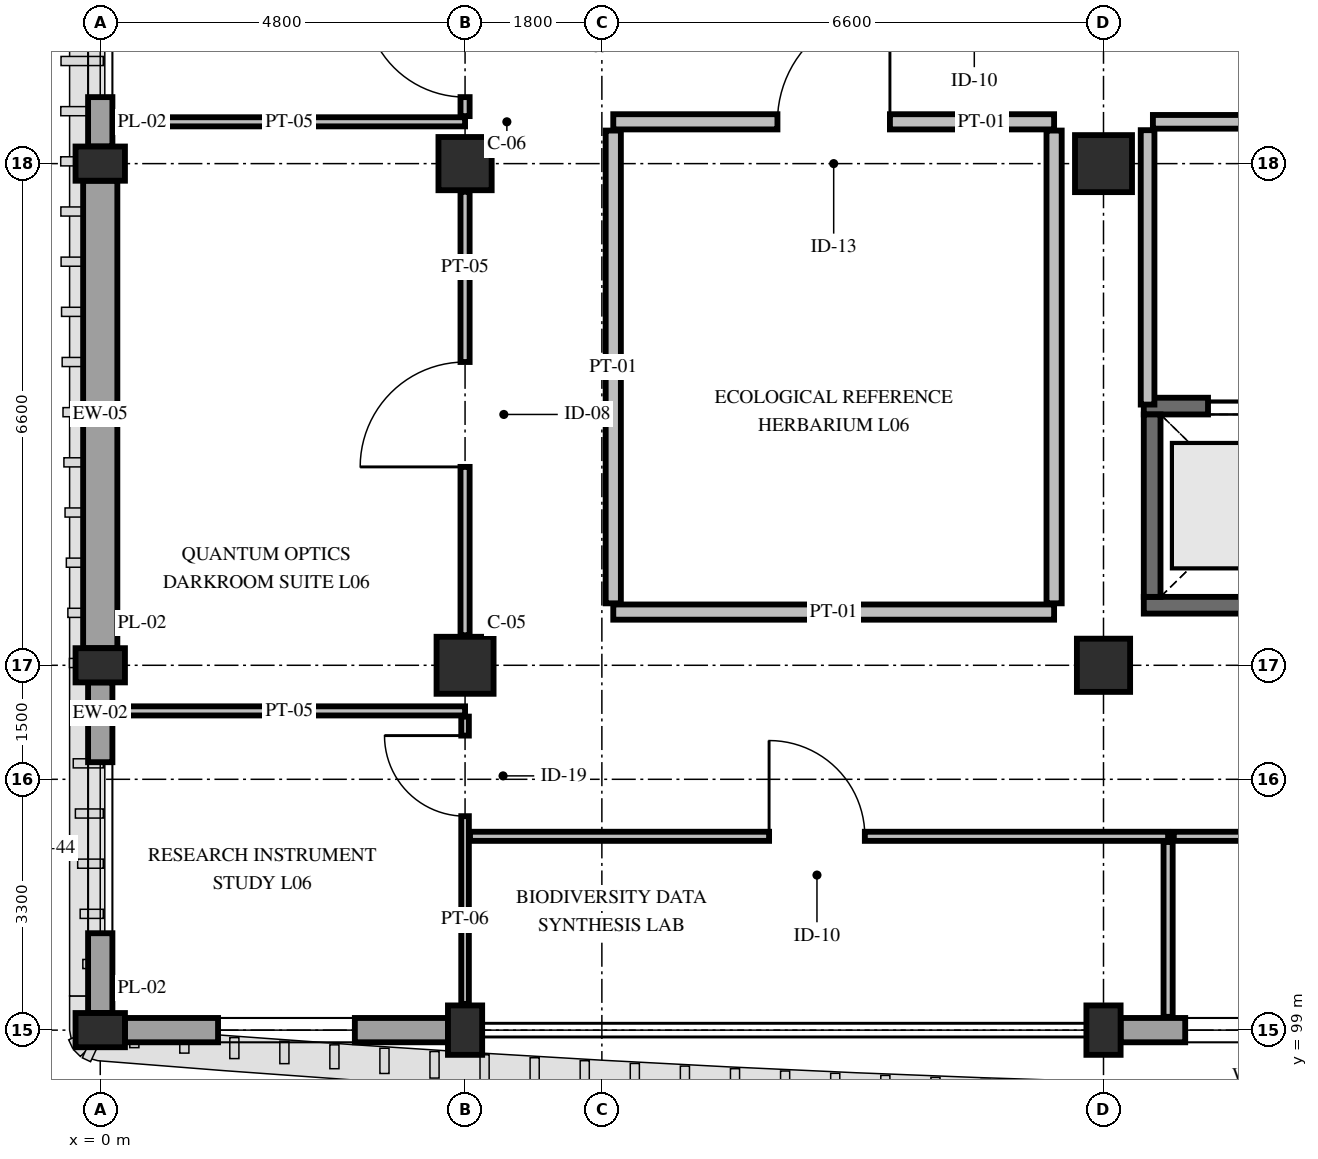
"""IFC4 building model, lengths in metres.
Left out: names, types, materials, properties, quantities, classifications, styles, units other than length and angle.
Written with IfcOpenShell. Run it as: python <this file> out.ifc"""

import sys

from ifc_helpers import new_model, si_unit, direction, frame, frame_2d, origin, origin_2d, place, context, subcontext, project, spatial, rectangle, extrude, element, fill, save


model = new_model("IFC4")
c1 = context("Model", 3, precision=1e-05, world=origin(), true_north=direction((0.0, 1.0)))
c2 = subcontext(c1, "Body", "Model", "MODEL_VIEW")
j1 = project(units=[si_unit("LENGTHUNIT", "METRE"), si_unit("PLANEANGLEUNIT", "RADIAN")], contexts=[c1])
p1 = place(None, origin())
s1 = spatial("IfcSite", under=j1, at=p1, CompositionType="ELEMENT")
p2 = place(p1, origin())
s2 = spatial("IfcBuilding", under=s1, at=p2, CompositionType="ELEMENT")
p3 = place(p2, frame((0.0, 0.0, 29.4)))
s3 = spatial("IfcBuildingStorey", under=s2, at=p3, CompositionType="ELEMENT", Elevation=29.4)
for number, where, z_axis, x_axis in (
    (1, (0.0, 99.0, 0.0), (0.0, 0.0, 1.0), (0.0, 1.0, 0.0)),
    (2, (0.0, 103.8, 0.0), (0.0, 0.0, 1.0), (0.0, 1.0, 0.0)),
    (3, (0.0, 110.4, 0.0), (0.0, 0.0, 1.0), (0.0, 1.0, 0.0)),
    (4, (4.8, 99.0, 0.0), (0.0, 0.0, 1.0), (1.0, 0.0, 0.0)),
):
    element("IfcColumn", number, at=place(p3, frame(where, z_axis=z_axis, x_axis=x_axis)), inside=s3, PredefinedType="PILASTER", context=c2, shape_type="SweptSolid", body=[
        extrude(rectangle(XDim=0.45, YDim=0.65, at=origin_2d()), origin(), (0.0, 0.0, 1.0), 4.8),
    ])
p4 = place(p3, frame((4.8, 103.8, 0.0), z_axis=(0.0, 0.0, 1.0), x_axis=(1.0, 0.0, 0.0)))
e5 = element("IfcColumn", 5, at=p4, inside=s3, PredefinedType="COLUMN", context=c2, shape_type="SweptSolid", body=[
    extrude(rectangle(XDim=0.75, YDim=0.75, at=origin_2d()), origin(), (0.0, 0.0, 1.0), 4.8),
])
p5 = place(p3, frame((4.8, 110.4, 0.0), z_axis=(0.0, 0.0, 1.0), x_axis=(1.0, 0.0, 0.0)))
e6 = element("IfcColumn", 6, at=p5, inside=s3, PredefinedType="COLUMN", context=c2, shape_type="SweptSolid", body=[
    extrude(rectangle(XDim=0.7, YDim=0.7, at=origin_2d()), origin(), (0.0, 0.0, 1.0), 4.8),
])
p6 = place(p3, frame((13.2, 99.0, 0.0), z_axis=(0.0, 0.0, 1.0), x_axis=(1.0, 0.0, 0.0)))
e7 = element("IfcColumn", 7, at=p6, inside=s3, PredefinedType="PILASTER", context=c2, shape_type="SweptSolid", body=[
    extrude(rectangle(XDim=0.45, YDim=0.65, at=origin_2d()), origin(), (0.0, 0.0, 1.0), 4.8),
])
p7 = place(p3, frame((13.2, 103.8, 0.0), z_axis=(0.0, 0.0, 1.0), x_axis=(1.0, 0.0, 0.0)))
e8 = element("IfcColumn", 8, at=p7, inside=s3, PredefinedType="COLUMN", context=c2, shape_type="SweptSolid", body=[
    extrude(rectangle(XDim=0.7, YDim=0.7, at=origin_2d()), origin(), (0.0, 0.0, 1.0), 4.8),
])
p8 = place(p3, frame((13.2, 110.4, 0.0), z_axis=(0.0, 0.0, 1.0), x_axis=(1.0, 0.0, 0.0)))
e9 = element("IfcColumn", 9, at=p8, inside=s3, PredefinedType="COLUMN", context=c2, shape_type="SweptSolid", body=[
    extrude(rectangle(XDim=0.75, YDim=0.75, at=origin_2d()), origin(), (0.0, 0.0, 1.0), 4.8),
])
p9 = place(p3, frame((0.0, 99.225, 0.0), z_axis=(0.0, 0.0, 1.0), x_axis=(0.0, 1.0, 0.0)))
e10 = element("IfcWall", 10, at=p9, inside=s3, PredefinedType="STANDARD", context=c2, shape_type="SweptSolid", body=[
    extrude(rectangle(XDim=4.35, YDim=0.32, at=frame_2d((2.175, 0.0))), origin(), (0.0, 0.0, 1.0), 3.95),
])
p10 = place(p9, frame((1.05, 0.0, 0.85)))
e11 = element("IfcOpeningElement", 11, at=p10, cuts=e10, PredefinedType="OPENING", context=c2, shape_type="SweptSolid", body=[
    extrude(rectangle(XDim=2.25, YDim=2.24, at=frame_2d((1.125, 1.12))), frame((0.0, 0.175, 0.0), z_axis=(0.0, -1.0, 0.0), x_axis=(1.0, 0.0, 0.0)), (0.0, 0.0, 1.0), 0.35),
])
p11 = place(p3, frame((0.0, 104.025, 0.0), z_axis=(0.0, 0.0, 1.0), x_axis=(0.0, 1.0, 0.0)))
e12 = element("IfcWall", 12, at=p11, inside=s3, PredefinedType="SOLIDWALL", context=c2, shape_type="SweptSolid", body=[
    extrude(rectangle(XDim=6.15, YDim=0.45, at=frame_2d((3.075, 0.0))), origin(), (0.0, 0.0, 1.0), 3.95),
])
p12 = place(p3, frame((0.0, 110.625, 0.0), z_axis=(0.0, 0.0, 1.0), x_axis=(0.0, 1.0, 0.0)))
e13 = element("IfcWall", 13, at=p12, inside=s3, PredefinedType="STANDARD", context=c2, shape_type="SweptSolid", body=[
    extrude(rectangle(XDim=6.45, YDim=0.32, at=frame_2d((3.225, 0.0))), origin(), (0.0, 0.0, 1.0), 3.95),
])
p13 = place(p12, frame((0.65, 0.0, 0.85)))
e14 = element("IfcOpeningElement", 14, at=p13, cuts=e13, PredefinedType="OPENING", context=c2, shape_type="SweptSolid", body=[
    extrude(rectangle(XDim=2.25, YDim=2.24, at=frame_2d((1.125, 1.12))), frame((0.0, 0.175, 0.0), z_axis=(0.0, -1.0, 0.0), x_axis=(1.0, 0.0, 0.0)), (0.0, 0.0, 1.0), 0.35),
])
p14 = place(p12, frame((3.55, 0.0, 0.85)))
e15 = element("IfcOpeningElement", 15, at=p14, cuts=e13, PredefinedType="OPENING", context=c2, shape_type="SweptSolid", body=[
    extrude(rectangle(XDim=2.25, YDim=2.24, at=frame_2d((1.125, 1.12))), frame((0.0, 0.175, 0.0), z_axis=(0.0, -1.0, 0.0), x_axis=(1.0, 0.0, 0.0)), (0.0, 0.0, 1.0), 0.35),
])
p15 = place(p3, frame((19.575, 99.0, 0.0), z_axis=(0.0, 0.0, 1.0), x_axis=(-1.0, 0.0, 0.0)))
e16 = element("IfcWall", 16, at=p15, inside=s3, PredefinedType="STANDARD", context=c2, shape_type="SweptSolid", body=[
    extrude(rectangle(XDim=6.15, YDim=0.32, at=frame_2d((3.075, 0.0))), origin(), (0.0, 0.0, 1.0), 3.93),
])
p16 = place(p15, frame((0.85, 0.0, 0.85)))
e17 = element("IfcOpeningElement", 17, at=p16, cuts=e16, PredefinedType="OPENING", context=c2, shape_type="SweptSolid", body=[
    extrude(rectangle(XDim=1.8, YDim=1.5, at=frame_2d((0.9, 0.75))), frame((0.0, 0.175, 0.0), z_axis=(0.0, -1.0, 0.0), x_axis=(1.0, 0.0, 0.0)), (0.0, 0.0, 1.0), 0.35),
])
p17 = place(p15, frame((3.5, 0.0, 0.85)))
e18 = element("IfcOpeningElement", 18, at=p17, cuts=e16, PredefinedType="OPENING", context=c2, shape_type="SweptSolid", body=[
    extrude(rectangle(XDim=1.8, YDim=1.5, at=frame_2d((0.9, 0.75))), frame((0.0, 0.175, 0.0), z_axis=(0.0, -1.0, 0.0), x_axis=(1.0, 0.0, 0.0)), (0.0, 0.0, 1.0), 0.35),
])
p18 = place(p3, frame((4.575, 99.0, 0.0), z_axis=(0.0, 0.0, 1.0), x_axis=(-1.0, 0.0, 0.0)))
e19 = element("IfcWall", 19, at=p18, inside=s3, PredefinedType="STANDARD", context=c2, shape_type="SweptSolid", body=[
    extrude(rectangle(XDim=4.25, YDim=0.32, at=frame_2d((2.125, 0.0))), origin(), (0.0, 0.0, 1.0), 3.95),
])
p19 = place(p18, frame((1.225, 0.0, 0.85)))
e20 = element("IfcOpeningElement", 20, at=p19, cuts=e19, PredefinedType="OPENING", context=c2, shape_type="SweptSolid", body=[
    extrude(rectangle(XDim=1.8, YDim=1.5, at=frame_2d((0.9, 0.75))), frame((0.0, 0.175, 0.0), z_axis=(0.0, -1.0, 0.0), x_axis=(1.0, 0.0, 0.0)), (0.0, 0.0, 1.0), 0.35),
])
p20 = place(p3, frame((13.73, 104.59, 0.0), z_axis=(0.0, 0.0, 1.0), x_axis=(1.0, 0.0, 0.0)))
e21 = element("IfcWall", 21, at=p20, inside=s3, PredefinedType="SHEAR", context=c2, shape_type="SweptSolid", body=[
    extrude(rectangle(XDim=2.89, YDim=0.22, at=frame_2d((1.445, 0.0))), origin(), (0.0, 0.0, 1.0), 4.52),
])
p21 = place(p3, frame((13.73, 107.21, 0.0), z_axis=(0.0, 0.0, 1.0), x_axis=(1.0, 0.0, 0.0)))
e22 = element("IfcWall", 22, at=p21, inside=s3, PredefinedType="SHEAR", context=c2, shape_type="SweptSolid", body=[
    extrude(rectangle(XDim=2.89, YDim=0.22, at=frame_2d((1.445, 0.0))), origin(), (0.0, 0.0, 1.0), 4.52),
])
p22 = place(p21, frame((0.845, 0.0, 0.0)))
e23 = element("IfcOpeningElement", 23, at=p22, cuts=e22, PredefinedType="OPENING", context=c2, shape_type="SweptSolid", body=[
    extrude(rectangle(XDim=1.2, YDim=2.2, at=frame_2d((0.6, 1.1))), frame((0.0, 0.125, 0.0), z_axis=(0.0, -1.0, 0.0), x_axis=(1.0, 0.0, 0.0)), (0.0, 0.0, 1.0), 0.25),
])
p23 = place(p3, frame((13.84, 104.7, 0.0), z_axis=(0.0, 0.0, 1.0), x_axis=(0.0, 1.0, 0.0)))
e24 = element("IfcWall", 24, at=p23, inside=s3, PredefinedType="SHEAR", context=c2, shape_type="SweptSolid", body=[
    extrude(rectangle(XDim=2.4, YDim=0.22, at=frame_2d((1.2, 0.0))), origin(), (0.0, 0.0, 1.0), 4.52),
])
p24 = place(p3, frame((13.85, 110.95, 0.0), z_axis=(0.0, 0.0, 1.0), x_axis=(1.0, 0.0, 0.0)))
e25 = element("IfcWall", 25, at=p24, inside=s3, PredefinedType="PARTITIONING", context=c2, shape_type="SweptSolid", body=[
    extrude(rectangle(XDim=5.47, YDim=0.18, at=frame_2d((2.735, 0.0))), origin(), (0.0, 0.0, 1.0), 4.345),
])
p25 = place(p24, frame((1.85, 0.0, 0.0)))
e26 = element("IfcOpeningElement", 26, at=p25, cuts=e25, PredefinedType="OPENING", context=c2, shape_type="SweptSolid", body=[
    extrude(rectangle(XDim=1.6, YDim=2.25, at=frame_2d((0.8, 1.125))), frame((0.0, 0.105, 0.0), z_axis=(0.0, -1.0, 0.0), x_axis=(1.0, 0.0, 0.0)), (0.0, 0.0, 1.0), 0.21),
])
p26 = place(p3, frame((13.78, 107.23, 0.0), z_axis=(0.0, 0.0, 1.0), x_axis=(0.0, 1.0, 0.0)))
e27 = element("IfcWall", 27, at=p26, inside=s3, PredefinedType="PARTITIONING", context=c2, shape_type="SweptSolid", body=[
    extrude(rectangle(XDim=3.61, YDim=0.18, at=frame_2d((1.805, 0.0))), origin(), (0.0, 0.0, 1.0), 4.18),
])
p27 = place(p3, frame((6.75, 104.5, 0.0), z_axis=(0.0, 0.0, 1.0), x_axis=(1.0, 0.0, 0.0)))
e28 = element("IfcWall", 28, at=p27, inside=s3, PredefinedType="PARTITIONING", context=c2, shape_type="SweptSolid", body=[
    extrude(rectangle(XDim=5.8, YDim=0.2, at=frame_2d((2.9, 0.0))), origin(), (0.0, 0.0, 1.0), 4.345),
])
p28 = place(p3, frame((6.75, 110.95, 0.0), z_axis=(0.0, 0.0, 1.0), x_axis=(1.0, 0.0, 0.0)))
e29 = element("IfcWall", 29, at=p28, inside=s3, PredefinedType="PARTITIONING", context=c2, shape_type="SweptSolid", body=[
    extrude(rectangle(XDim=5.8, YDim=0.2, at=frame_2d((2.9, 0.0))), origin(), (0.0, 0.0, 1.0), 4.345),
])
p29 = place(p28, frame((2.16, 0.0, 0.0)))
e30 = element("IfcOpeningElement", 30, at=p29, cuts=e29, PredefinedType="OPENING", context=c2, shape_type="SweptSolid", body=[
    extrude(rectangle(XDim=1.48, YDim=2.3, at=frame_2d((0.74, 1.15))), frame((0.0, 0.115, 0.0), z_axis=(0.0, -1.0, 0.0), x_axis=(1.0, 0.0, 0.0)), (0.0, 0.0, 1.0), 0.23),
])
for number, where, z_axis, x_axis in (
    (31, (6.75, 104.615, 0.0), (0.0, 0.0, 1.0), (0.0, 1.0, 0.0)),
    (32, (12.55, 104.615, 0.0), (0.0, 0.0, 1.0), (0.0, 1.0, 0.0)),
):
    element("IfcWall", number, at=place(p3, frame(where, z_axis=z_axis, x_axis=x_axis)), inside=s3, PredefinedType="PARTITIONING", context=c2, shape_type="SweptSolid", body=[
        extrude(rectangle(XDim=6.22, YDim=0.2, at=frame_2d((3.11, 0.0))), origin(), (0.0, 0.0, 1.0), 3.83),
    ])
for number, where, z_axis, x_axis in (
    (33, (0.175, 103.2, 0.0), (0.0, 0.0, 1.0), (1.0, 0.0, 0.0)),
    (34, (0.175, 110.95, 0.0), (0.0, 0.0, 1.0), (1.0, 0.0, 0.0)),
):
    element("IfcWall", number, at=place(p3, frame(where, z_axis=z_axis, x_axis=x_axis)), inside=s3, PredefinedType="PARTITIONING", context=c2, shape_type="SweptSolid", body=[
        extrude(rectangle(XDim=4.625, YDim=0.12, at=frame_2d((2.312, 0.0))), origin(), (0.0, 0.0, 1.0), 4.08),
    ])
p30 = place(p3, frame((4.8, 104.195, 0.0), z_axis=(0.0, 0.0, 1.0), x_axis=(0.0, 1.0, 0.0)))
e35 = element("IfcWall", 35, at=p30, inside=s3, PredefinedType="PARTITIONING", context=c2, shape_type="SweptSolid", body=[
    extrude(rectangle(XDim=5.835, YDim=0.12, at=frame_2d((2.917, 0.0))), origin(), (0.0, 0.0, 1.0), 4.08),
])
p31 = place(p30, frame((2.215, 0.0, 0.0)))
e36 = element("IfcOpeningElement", 36, at=p31, cuts=e35, PredefinedType="OPENING", context=c2, shape_type="SweptSolid", body=[
    extrude(rectangle(XDim=1.38, YDim=2.25, at=frame_2d((0.69, 1.125))), frame((0.0, 0.075, 0.0), z_axis=(0.0, -1.0, 0.0), x_axis=(1.0, 0.0, 0.0)), (0.0, 0.0, 1.0), 0.15),
])
p32 = place(p3, frame((4.8, 111.025, 0.0), z_axis=(0.0, 0.0, 1.0), x_axis=(0.0, 1.0, 0.0)))
e37 = element("IfcWall", 37, at=p32, inside=s3, PredefinedType="PARTITIONING", context=c2, shape_type="SweptSolid", body=[
    extrude(rectangle(XDim=5.88, YDim=0.12, at=frame_2d((2.94, 0.0))), origin(), (0.0, 0.0, 1.0), 4.08),
])
p33 = place(p32, frame((0.25, 0.0, 0.0)))
e38 = element("IfcOpeningElement", 38, at=p33, cuts=e37, PredefinedType="OPENING", context=c2, shape_type="SweptSolid", body=[
    extrude(rectangle(XDim=1.32, YDim=2.2, at=frame_2d((0.66, 1.1))), frame((0.0, 0.075, 0.0), z_axis=(0.0, -1.0, 0.0), x_axis=(1.0, 0.0, 0.0)), (0.0, 0.0, 1.0), 0.15),
])
p34 = place(p3, frame((4.8, 99.345, 0.0), z_axis=(0.0, 0.0, 1.0), x_axis=(0.0, 1.0, 0.0)))
e39 = element("IfcWall", 39, at=p34, inside=s3, PredefinedType="PARTITIONING", context=c2, shape_type="SweptSolid", body=[
    extrude(rectangle(XDim=3.78, YDim=0.1, at=frame_2d((1.89, 0.0))), origin(), (0.0, 0.0, 1.0), 4.08),
])
p35 = place(p34, frame((2.47, 0.0, 0.0)))
e40 = element("IfcOpeningElement", 40, at=p35, cuts=e39, PredefinedType="OPENING", context=c2, shape_type="SweptSolid", body=[
    extrude(rectangle(XDim=1.06, YDim=2.2, at=frame_2d((0.53, 1.1))), frame((0.0, 0.065, 0.0), z_axis=(0.0, -1.0, 0.0), x_axis=(1.0, 0.0, 0.0)), (0.0, 0.0, 1.0), 0.13),
])
p36 = place(p3, frame((4.865, 101.55, 0.0), z_axis=(0.0, 0.0, 1.0), x_axis=(1.0, 0.0, 0.0)))
e41 = element("IfcWall", 41, at=p36, inside=s3, PredefinedType="PARTITIONING", context=c2, shape_type="SweptSolid", body=[
    extrude(rectangle(XDim=9.185, YDim=0.12, at=frame_2d((4.593, 0.0))), origin(), (0.0, 0.0, 1.0), 4.08),
])
p37 = place(p36, frame((3.935, 0.0, 0.0)))
e42 = element("IfcOpeningElement", 42, at=p37, cuts=e41, PredefinedType="OPENING", context=c2, shape_type="SweptSolid", body=[
    extrude(rectangle(XDim=1.26, YDim=2.2, at=frame_2d((0.63, 1.1))), frame((0.0, 0.075, 0.0), z_axis=(0.0, -1.0, 0.0), x_axis=(1.0, 0.0, 0.0)), (0.0, 0.0, 1.0), 0.15),
])
p38 = place(p3, frame((14.05, 99.175, 0.0), z_axis=(0.0, 0.0, 1.0), x_axis=(0.0, 1.0, 0.0)))
e43 = element("IfcWall", 43, at=p38, inside=s3, PredefinedType="PARTITIONING", context=c2, shape_type="SweptSolid", body=[
    extrude(rectangle(XDim=2.3, YDim=0.12, at=frame_2d((1.15, 0.0))), origin(), (0.0, 0.0, 1.0), 3.93),
])
p39 = place(p3, frame((14.125, 101.55, 0.0), z_axis=(0.0, 0.0, 1.0), x_axis=(1.0, 0.0, 0.0)))
e44 = element("IfcWall", 44, at=p39, inside=s3, PredefinedType="PARTITIONING", context=c2, shape_type="SweptSolid", body=[
    extrude(rectangle(XDim=13.475, YDim=0.12, at=frame_2d((6.738, 0.0))), origin(), (0.0, 0.0, 1.0), 4.13),
])
p40 = place(p39, frame((6.385, 0.0, 0.0)))
e45 = element("IfcOpeningElement", 45, at=p40, cuts=e44, PredefinedType="OPENING", context=c2, shape_type="SweptSolid", body=[
    extrude(rectangle(XDim=1.68, YDim=2.3, at=frame_2d((0.84, 1.15))), frame((0.0, 0.075, 0.0), z_axis=(0.0, -1.0, 0.0), x_axis=(1.0, 0.0, 0.0)), (0.0, 0.0, 1.0), 0.15),
])
p41 = place(p10, origin())
e46 = element("IfcWindow", 46, at=p41, inside=s3, PartitioningType="DOUBLE_PANEL_VERTICAL", PredefinedType="WINDOW", context=c2, shape_type="SweptSolid", body=[
    extrude(rectangle(XDim=2.25, YDim=2.24, at=frame_2d((1.125, 1.12))), frame((0.0, 0.03, 0.0), z_axis=(0.0, -1.0, 0.0), x_axis=(1.0, 0.0, 0.0)), (0.0, 0.0, 1.0), 0.06),
])
fill(e11, e46)
p42 = place(p13, origin())
e47 = element("IfcWindow", 47, at=p42, inside=s3, PartitioningType="DOUBLE_PANEL_VERTICAL", PredefinedType="WINDOW", context=c2, shape_type="SweptSolid", body=[
    extrude(rectangle(XDim=2.25, YDim=2.24, at=frame_2d((1.125, 1.12))), frame((0.0, 0.03, 0.0), z_axis=(0.0, -1.0, 0.0), x_axis=(1.0, 0.0, 0.0)), (0.0, 0.0, 1.0), 0.06),
])
fill(e14, e47)
p43 = place(p17, origin())
e48 = element("IfcWindow", 48, at=p43, inside=s3, PartitioningType="DOUBLE_PANEL_VERTICAL", PredefinedType="WINDOW", context=c2, shape_type="SweptSolid", body=[
    extrude(rectangle(XDim=1.8, YDim=1.5, at=frame_2d((0.9, 0.75))), frame((0.0, 0.03, 0.0), z_axis=(0.0, -1.0, 0.0), x_axis=(1.0, 0.0, 0.0)), (0.0, 0.0, 1.0), 0.06),
])
fill(e18, e48)
p44 = place(p19, origin())
e49 = element("IfcWindow", 49, at=p44, inside=s3, PartitioningType="DOUBLE_PANEL_VERTICAL", PredefinedType="WINDOW", context=c2, shape_type="SweptSolid", body=[
    extrude(rectangle(XDim=1.8, YDim=1.5, at=frame_2d((0.9, 0.75))), frame((0.0, 0.03, 0.0), z_axis=(0.0, -1.0, 0.0), x_axis=(1.0, 0.0, 0.0)), (0.0, 0.0, 1.0), 0.06),
])
fill(e20, e49)
p45 = place(p22, origin())
e50 = element("IfcDoor", 50, at=p45, inside=s3, OperationType="DOUBLE_DOOR_SLIDING", PredefinedType="DOOR", context=c2, shape_type="SweptSolid", body=[
    extrude(rectangle(XDim=1.2, YDim=2.2, at=frame_2d((0.6, 1.1))), frame((0.0, 0.025, 0.0), z_axis=(0.0, -1.0, 0.0), x_axis=(1.0, 0.0, 0.0)), (0.0, 0.0, 1.0), 0.05),
])
fill(e23, e50)
p46 = place(p29, origin())
e51 = element("IfcDoor", 51, at=p46, inside=s3, OperationType="SINGLE_SWING_RIGHT", PredefinedType="DOOR", context=c2, shape_type="SweptSolid", body=[
    extrude(rectangle(XDim=1.48, YDim=2.3, at=frame_2d((0.74, 1.15))), frame((0.0, 0.025, 0.0), z_axis=(0.0, -1.0, 0.0), x_axis=(1.0, 0.0, 0.0)), (0.0, 0.0, 1.0), 0.05),
])
fill(e30, e51)
p47 = place(p31, origin())
e52 = element("IfcDoor", 52, at=p47, inside=s3, OperationType="SINGLE_SWING_LEFT", PredefinedType="DOOR", context=c2, shape_type="SweptSolid", body=[
    extrude(rectangle(XDim=1.38, YDim=2.25, at=frame_2d((0.69, 1.125))), frame((0.0, 0.025, 0.0), z_axis=(0.0, -1.0, 0.0), x_axis=(1.0, 0.0, 0.0)), (0.0, 0.0, 1.0), 0.05),
])
fill(e36, e52)
p48 = place(p33, origin())
e53 = element("IfcDoor", 53, at=p48, inside=s3, OperationType="SINGLE_SWING_RIGHT", PredefinedType="DOOR", context=c2, shape_type="SweptSolid", body=[
    extrude(rectangle(XDim=1.32, YDim=2.2, at=frame_2d((0.66, 1.1))), frame((0.0, 0.025, 0.0), z_axis=(0.0, -1.0, 0.0), x_axis=(1.0, 0.0, 0.0)), (0.0, 0.0, 1.0), 0.05),
])
fill(e38, e53)
p49 = place(p35, origin())
e54 = element("IfcDoor", 54, at=p49, inside=s3, OperationType="SINGLE_SWING_RIGHT", PredefinedType="DOOR", context=c2, shape_type="SweptSolid", body=[
    extrude(rectangle(XDim=1.06, YDim=2.2, at=frame_2d((0.53, 1.1))), frame((0.0, 0.025, 0.0), z_axis=(0.0, -1.0, 0.0), x_axis=(1.0, 0.0, 0.0)), (0.0, 0.0, 1.0), 0.05),
])
fill(e40, e54)
p50 = place(p37, origin())
e55 = element("IfcDoor", 55, at=p50, inside=s3, OperationType="SINGLE_SWING_LEFT", PredefinedType="DOOR", context=c2, shape_type="SweptSolid", body=[
    extrude(rectangle(XDim=1.26, YDim=2.2, at=frame_2d((0.63, 1.1))), frame((0.0, 0.025, 0.0), z_axis=(0.0, -1.0, 0.0), x_axis=(1.0, 0.0, 0.0)), (0.0, 0.0, 1.0), 0.05),
])
fill(e42, e55)
save(model, sys.argv[1])
